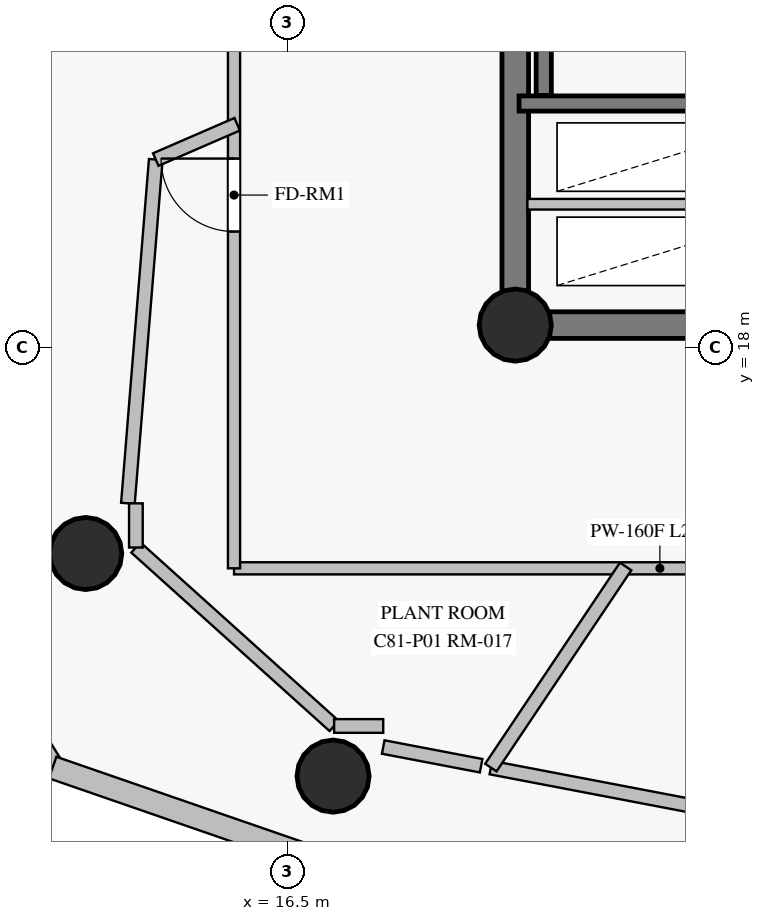
"""IFC4 building model, lengths in metres.
Left out: names, types, materials, properties, quantities, classifications, styles, units other than length and angle.
Written with IfcOpenShell. Run it as: python <this file> out.ifc"""

import sys

from ifc_helpers import new_model, si_unit, direction, frame, frame_2d, origin, origin_with_axes, origin_2d, place, context, subcontext, project, spatial, rectangle, circle, extrude, source, transform, mapped, element, fill, save


model = new_model("IFC4")
c1 = context("Model", 3, precision=1e-05, world=origin(), true_north=direction((0.0, 1.0)))
c2 = subcontext(c1, "Body", "Model", "MODEL_VIEW")
j1 = project(units=[si_unit("LENGTHUNIT", "METRE"), si_unit("PLANEANGLEUNIT", "RADIAN")], contexts=[c1])
p1 = place(None, origin())
s1 = spatial("IfcSite", under=j1, at=p1, CompositionType="ELEMENT")
p2 = place(p1, origin())
s2 = spatial("IfcBuilding", under=s1, at=p2, CompositionType="ELEMENT")
p3 = place(p2, frame((0.0, 0.0, 273.4)))
s3 = spatial("IfcBuildingStorey", under=s2, at=p3, CompositionType="ELEMENT", Elevation=273.4)
p4 = place(p3, frame((19.5, 18.3, 0.0), z_axis=(0.0, 0.0, 1.0), x_axis=(1.0, 0.0, 0.0)))
e1 = element("IfcWall", 1, at=p4, inside=s3, PredefinedType="SHEAR", context=c2, shape_type="SweptSolid", body=[
    extrude(rectangle(XDim=7.05, YDim=0.35, at=frame_2d((3.525, 0.0))), origin(), (0.0, 0.0, 1.0), 16.35),
])
p5 = place(p4, frame((4.2, 0.0, 0.0)))
e2 = element("IfcOpeningElement", 2, at=p5, cuts=e1, PredefinedType="OPENING", context=c2, shape_type="SweptSolid", body=[
    extrude(rectangle(XDim=1.4, YDim=2.2, at=frame_2d((0.7, 1.1))), frame((0.0, 0.185, 0.0), z_axis=(0.0, -1.0, 0.0), x_axis=(1.0, 0.0, 0.0)), (0.0, 0.0, 1.0), 0.37),
])
p6 = place(p3, frame((19.5, 34.7, 0.0), z_axis=(0.0, 0.0, 1.0), x_axis=(0.0, -1.0, 0.0)))
e3 = element("IfcWall", 3, at=p6, inside=s3, PredefinedType="SHEAR", context=c2, shape_type="SweptSolid", body=[
    extrude(rectangle(XDim=16.4, YDim=0.35, at=frame_2d((8.2, 0.0))), origin(), (0.0, 0.0, 1.0), 16.35),
])
p7 = place(p6, frame((3.1, 0.0, 0.0)))
e4 = element("IfcOpeningElement", 4, at=p7, cuts=e3, PredefinedType="OPENING", context=c2, shape_type="SweptSolid", body=[
    extrude(rectangle(XDim=1.1, YDim=2.15, at=frame_2d((0.55, 1.075))), frame((0.0, 0.185, 0.0), z_axis=(0.0, -1.0, 0.0), x_axis=(1.0, 0.0, 0.0)), (0.0, 0.0, 1.0), 0.37),
])
m1 = source(origin_with_axes(), c2, "Body", "SweptSolid", [
    extrude(circle(Radius=0.475, at=origin_2d()), origin(), (0.0, 0.0, 1.0), 16.6),
])
for number, where, z_axis, x_axis in (
    (5, (19.5, 18.3, 0.0), (0.0, 0.0, 1.0), (1.0, 0.0, 0.0)),
    (6, (13.849, 15.295, 0.0), (0.0, 0.0, 1.0), (1.0, 0.0, 0.0)),
    (7, (17.103, 12.366, 0.0), (0.0, 0.0, 1.0), (1.0, 0.0, 0.0)),
):
    element("IfcColumn", number, at=place(p3, frame(where, z_axis=z_axis, x_axis=x_axis)), inside=s3, PredefinedType="COLUMN", context=c2, shape_type="MappedRepresentation", body=[
        mapped(m1, transform((0.0, 0.0, 0.0), scale=1.0)),
    ])
p8 = place(p3, frame((9.285, 19.087, 0.0), z_axis=(0.0, 0.0, 1.0), x_axis=(0.529911631117, -0.848052865809, 0.0)))
e8 = element("IfcWall", 8, at=p8, inside=s3, PredefinedType="SOLIDWALL", context=c2, shape_type="SweptSolid", body=[
    extrude(rectangle(XDim=7.792, YDim=0.3, at=frame_2d((3.896, 0.0))), origin(), (0.0, 0.0, 1.0), 16.35),
])
p9 = place(p3, frame((13.414, 12.479, 0.0), z_axis=(0.0, 0.0, 1.0), x_axis=(0.945081634544, -0.326834367912, 0.0)))
e9 = element("IfcWall", 9, at=p9, inside=s3, PredefinedType="SOLIDWALL", context=c2, shape_type="SweptSolid", body=[
    extrude(rectangle(XDim=10.869, YDim=0.3, at=frame_2d((5.435, 0.0))), origin(), (0.0, 0.0, 1.0), 16.35),
])
p10 = place(p3, frame((19.875, 21.32, 0.0), z_axis=(0.0, 0.0, 1.0), x_axis=(0.0, 1.0, 0.0)))
e10 = element("IfcWall", 10, at=p10, inside=s3, PredefinedType="SHEAR", context=c2, shape_type="SweptSolid", body=[
    extrude(rectangle(XDim=7.5, YDim=0.2, at=frame_2d((3.75, 0.0))), origin(), (0.0, 0.0, 1.0), 16.35),
])
p11 = place(p3, frame((19.55, 21.215, 0.0), z_axis=(0.0, 0.0, 1.0), x_axis=(1.0, 0.0, 0.0)))
e11 = element("IfcWall", 11, at=p11, inside=s3, PredefinedType="SHEAR", context=c2, shape_type="SweptSolid", body=[
    extrude(rectangle(XDim=3.995, YDim=0.2, at=frame_2d((1.998, 0.0))), origin(), (0.0, 0.0, 1.0), 16.35),
])
p12 = place(p3, frame((39.76, 15.1, 0.0), z_axis=(0.0, 0.0, 1.0), x_axis=(-1.0, 0.0, 0.0)))
e12 = element("IfcWall", 12, at=p12, inside=s3, PredefinedType="PARTITIONING", context=c2, shape_type="SweptSolid", body=[
    extrude(rectangle(XDim=23.96, YDim=0.16, at=frame_2d((11.98, 0.0))), origin(), (0.0, 0.0, 1.0), 15.65),
])
p13 = place(p12, frame((11.795, 0.0, 0.0)))
e13 = element("IfcOpeningElement", 13, at=p13, cuts=e12, PredefinedType="OPENING", context=c2, shape_type="SweptSolid", body=[
    extrude(rectangle(XDim=0.96, YDim=2.15, at=frame_2d((0.48, 1.075))), frame((0.0, 0.09, 0.0), z_axis=(0.0, -1.0, 0.0), x_axis=(1.0, 0.0, 0.0)), (0.0, 0.0, 1.0), 0.18),
])
p14 = place(p12, frame((7.911, 0.0, 0.0)))
e14 = element("IfcOpeningElement", 14, at=p14, cuts=e12, PredefinedType="OPENING", context=c2, shape_type="SweptSolid", body=[
    extrude(rectangle(XDim=0.96, YDim=2.15, at=frame_2d((0.48, 1.075))), frame((0.0, 0.09, 0.0), z_axis=(0.0, -1.0, 0.0), x_axis=(1.0, 0.0, 0.0)), (0.0, 0.0, 1.0), 0.18),
])
p15 = place(p3, frame((15.8, 15.1, 0.0), z_axis=(0.0, 0.0, 1.0), x_axis=(0.0, 1.0, 0.0)))
e15 = element("IfcWall", 15, at=p15, inside=s3, PredefinedType="PARTITIONING", context=c2, shape_type="SweptSolid", body=[
    extrude(rectangle(XDim=20.782, YDim=0.16, at=frame_2d((10.391, 0.0))), origin(), (0.0, 0.0, 1.0), 15.65),
])
p16 = place(p15, frame((4.431, 0.0, 0.0)))
e16 = element("IfcOpeningElement", 16, at=p16, cuts=e15, PredefinedType="OPENING", context=c2, shape_type="SweptSolid", body=[
    extrude(rectangle(XDim=0.96, YDim=2.15, at=frame_2d((0.48, 1.075))), frame((0.0, 0.09, 0.0), z_axis=(0.0, -1.0, 0.0), x_axis=(1.0, 0.0, 0.0)), (0.0, 0.0, 1.0), 0.18),
])
p17 = place(p3, frame((26.579, 11.065, 0.0), z_axis=(0.0, 0.0, 1.0), x_axis=(-0.982245124485, 0.187602013383, 0.0)))
e17 = element("IfcWall", 17, at=p17, inside=s3, PredefinedType="PARTITIONING", context=c2, shape_type="SweptSolid", body=[
    extrude(rectangle(XDim=7.534, YDim=0.18, at=frame_2d((3.767, 0.0))), origin(), (0.0, 0.0, 1.0), 15.65),
])
p18 = place(p3, frame((14.404, 15.955, 0.0), z_axis=(0.0, 0.0, 1.0), x_axis=(0.080760970591, 0.996733497796, 0.0)))
e18 = element("IfcWall", 18, at=p18, inside=s3, PredefinedType="PARTITIONING", context=c2, shape_type="SweptSolid", body=[
    extrude(rectangle(XDim=4.538, YDim=0.18, at=frame_2d((2.269, 0.0))), origin(), (0.0, 0.0, 1.0), 15.65),
])
p19 = place(p3, frame((19.66, 19.89, 0.0), z_axis=(0.0, 0.0, 1.0), x_axis=(1.0, 0.0, 0.0)))
e19 = element("IfcWall", 19, at=p19, inside=s3, PredefinedType="PARTITIONING", context=c2, shape_type="SweptSolid", body=[
    extrude(rectangle(XDim=3.837, YDim=0.14, at=frame_2d((1.919, 0.0))), origin(), (0.0, 0.0, 1.0), 16.35),
])
p20 = place(p3, frame((17.117, 13.026, 0.0), z_axis=(0.0, 0.0, 1.0), x_axis=(-0.743249171916, 0.669014699723, 0.0)))
e20 = element("IfcWall", 20, at=p20, inside=s3, PredefinedType="PARTITIONING", context=c2, shape_type="SweptSolid", body=[
    extrude(rectangle(XDim=3.509, YDim=0.18, at=frame_2d((1.754, 0.0))), origin(), (0.0, 0.0, 1.0), 15.65),
])
p21 = place(p3, frame((19.179, 12.479, 0.0), z_axis=(0.0, 0.0, 1.0), x_axis=(0.556573567223, 0.830798329481, 0.0)))
e21 = element("IfcWall", 21, at=p21, inside=s3, PredefinedType="PARTITIONING", context=c2, shape_type="SweptSolid", body=[
    extrude(rectangle(XDim=3.186, YDim=0.18, at=frame_2d((1.593, 0.0))), origin(), (0.0, 0.0, 1.0), 16.35),
])
p22 = place(p3, frame((19.051, 12.503, 0.0), z_axis=(0.0, 0.0, 1.0), x_axis=(-0.982234125925, 0.187659590397, 0.0)))
e22 = element("IfcWall", 22, at=p22, inside=s3, PredefinedType="PARTITIONING", context=c2, shape_type="SweptSolid", body=[
    extrude(rectangle(XDim=1.311, YDim=0.18, at=frame_2d((0.656, 0.0))), origin(), (0.0, 0.0, 1.0), 15.65),
])
p23 = place(p3, frame((14.771, 20.478, 0.0), z_axis=(0.0, 0.0, 1.0), x_axis=(0.917372391366, 0.398030018415, 0.0)))
e23 = element("IfcWall", 23, at=p23, inside=s3, PredefinedType="PARTITIONING", context=c2, shape_type="SweptSolid", body=[
    extrude(rectangle(XDim=1.167, YDim=0.18, at=frame_2d((0.583, 0.0))), origin(), (0.0, 0.0, 1.0), 16.35),
])
p24 = place(p3, frame((17.763, 13.026, 0.0), z_axis=(0.0, 0.0, 1.0), x_axis=(-1.0, 0.0, 0.0)))
e24 = element("IfcWall", 24, at=p24, inside=s3, PredefinedType="PARTITIONING", context=c2, shape_type="SweptSolid", body=[
    extrude(rectangle(XDim=0.646, YDim=0.18, at=frame_2d((0.323, 0.0))), origin(), (0.0, 0.0, 1.0), 15.65),
])
p25 = place(p3, frame((14.509, 15.374, 0.0), z_axis=(0.0, 0.0, 1.0), x_axis=(0.0, 1.0, 0.0)))
e25 = element("IfcWall", 25, at=p25, inside=s3, PredefinedType="PARTITIONING", context=c2, shape_type="SweptSolid", body=[
    extrude(rectangle(XDim=0.582, YDim=0.18, at=frame_2d((0.291, 0.0))), origin(), (0.0, 0.0, 1.0), 15.65),
])
m2 = source(origin_with_axes(), c2, "Body", "SweptSolid", [
    extrude(rectangle(XDim=0.96, YDim=2.15, at=frame_2d((0.48, 1.075))), frame((0.0, 0.025, 0.0), z_axis=(0.0, -1.0, 0.0), x_axis=(1.0, 0.0, 0.0)), (0.0, 0.0, 1.0), 0.05),
])
p26 = place(p16, origin())
e26 = element("IfcDoor", 26, at=p26, inside=s3, OperationType="SINGLE_SWING_RIGHT", PredefinedType="DOOR", context=c2, shape_type="MappedRepresentation", body=[
    mapped(m2, transform((0.0, 0.0, 0.0), scale=1.0)),
])
fill(e16, e26)
save(model, sys.argv[1])
